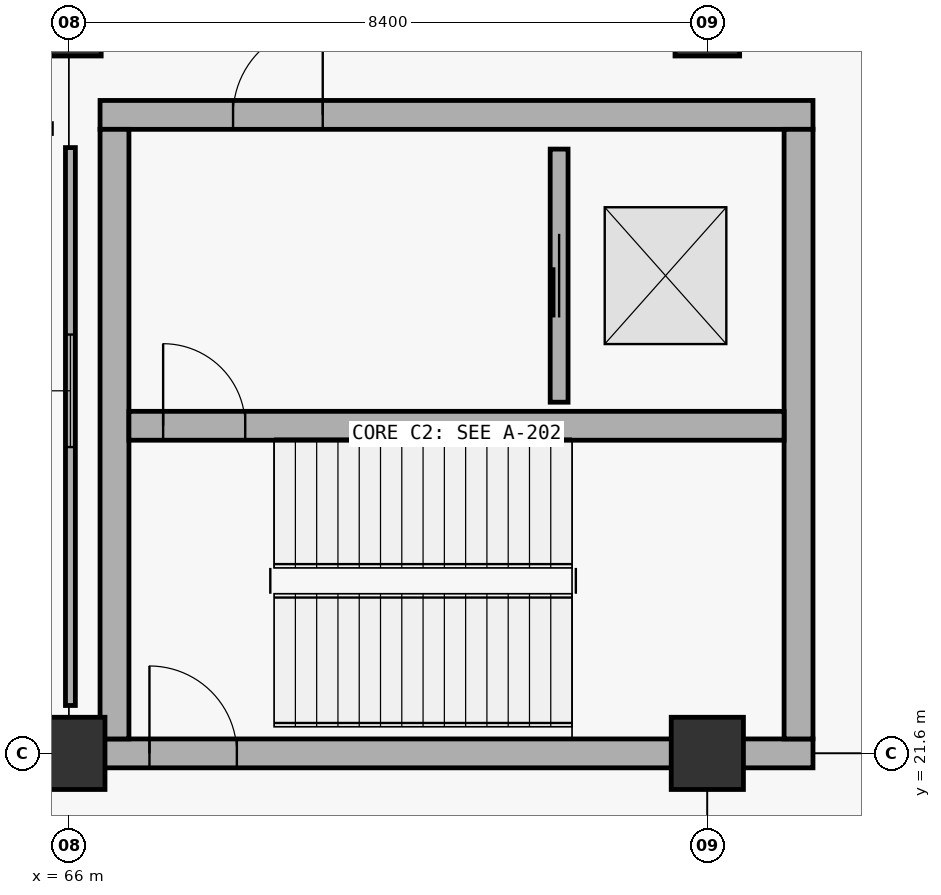
"""IFC4 building model, lengths in metres.
Left out: names, types, materials, properties, quantities, classifications, styles, units other than length and angle.
Written with IfcOpenShell. Run it as: python <this file> out.ifc"""

import sys

from ifc_helpers import new_model, si_unit, direction, frame, frame_2d, origin, origin_2d, place, context, subcontext, project, spatial, rectangle, extrude, element, fill, save


model = new_model("IFC4")
c1 = context("Model", 3, precision=1e-05, world=origin(), true_north=direction((0.0, 1.0)))
c2 = subcontext(c1, "Body", "Model", "MODEL_VIEW")
j1 = project(units=[si_unit("LENGTHUNIT", "METRE"), si_unit("PLANEANGLEUNIT", "RADIAN")], contexts=[c1])
p1 = place(None, origin())
s1 = spatial("IfcSite", under=j1, at=p1, CompositionType="ELEMENT")
p2 = place(p1, origin())
s2 = spatial("IfcBuilding", under=s1, at=p2, CompositionType="ELEMENT")
p3 = place(p2, origin())
s3 = spatial("IfcBuildingStorey", under=s2, at=p3, CompositionType="ELEMENT", Elevation=0.0)
p4 = place(p3, frame((66.0, 21.6, 0.0), z_axis=(0.0, 0.0, 1.0), x_axis=(1.0, 0.0, 0.0)))
e1 = element("IfcColumn", 1, at=p4, inside=s3, PredefinedType="COLUMN", context=c2, shape_type="SweptSolid", body=[
    extrude(rectangle(XDim=0.95, YDim=0.95, at=origin_2d()), origin(), (0.0, 0.0, 1.0), 5.4),
])
p5 = place(p3, frame((66.0, 31.2, 0.0), z_axis=(0.0, 0.0, 1.0), x_axis=(1.0, 0.0, 0.0)))
e2 = element("IfcColumn", 2, at=p5, inside=s3, PredefinedType="COLUMN", context=c2, shape_type="SweptSolid", body=[
    extrude(rectangle(XDim=0.85, YDim=0.85, at=origin_2d()), origin(), (0.0, 0.0, 1.0), 5.4),
])
p6 = place(p3, frame((74.4, 21.6, 0.0), z_axis=(0.0, 0.0, 1.0), x_axis=(1.0, 0.0, 0.0)))
e3 = element("IfcColumn", 3, at=p6, inside=s3, PredefinedType="COLUMN", context=c2, shape_type="SweptSolid", body=[
    extrude(rectangle(XDim=0.95, YDim=0.95, at=origin_2d()), origin(), (0.0, 0.0, 1.0), 5.4),
])
p7 = place(p3, frame((74.4, 31.2, 0.0), z_axis=(0.0, 0.0, 1.0), x_axis=(1.0, 0.0, 0.0)))
e4 = element("IfcColumn", 4, at=p7, inside=s3, PredefinedType="COLUMN", context=c2, shape_type="SweptSolid", body=[
    extrude(rectangle(XDim=0.85, YDim=0.85, at=origin_2d()), origin(), (0.0, 0.0, 1.0), 5.4),
])
p8 = place(p3, frame((66.41, 21.6, 0.0), z_axis=(0.0, 0.0, 1.0), x_axis=(1.0, 0.0, 0.0)))
e5 = element("IfcWall", 5, at=p8, inside=s3, PredefinedType="SHEAR", context=c2, shape_type="SweptSolid", body=[
    extrude(rectangle(XDim=9.38, YDim=0.38, at=frame_2d((4.69, 0.0))), origin(), (0.0, 0.0, 1.0), 5.4),
])
p9 = place(p8, frame((0.65, 0.0, 0.0)))
e6 = element("IfcOpeningElement", 6, at=p9, cuts=e5, PredefinedType="OPENING", context=c2, shape_type="SweptSolid", body=[
    extrude(rectangle(XDim=1.15, YDim=2.2, at=frame_2d((0.575, 1.1))), frame((0.0, 0.2, 0.0), z_axis=(0.0, -1.0, 0.0), x_axis=(1.0, 0.0, 0.0)), (0.0, 0.0, 1.0), 0.4),
])
p10 = place(p3, frame((66.41, 30.0, 0.0), z_axis=(0.0, 0.0, 1.0), x_axis=(1.0, 0.0, 0.0)))
e7 = element("IfcWall", 7, at=p10, inside=s3, PredefinedType="SHEAR", context=c2, shape_type="SweptSolid", body=[
    extrude(rectangle(XDim=9.38, YDim=0.38, at=frame_2d((4.69, 0.0))), origin(), (0.0, 0.0, 1.0), 5.4),
])
p11 = place(p10, frame((1.75, 0.0, 0.0)))
e8 = element("IfcOpeningElement", 8, at=p11, cuts=e7, PredefinedType="OPENING", context=c2, shape_type="SweptSolid", body=[
    extrude(rectangle(XDim=1.18, YDim=2.24, at=frame_2d((0.59, 1.12))), frame((0.0, 0.2, 0.0), z_axis=(0.0, -1.0, 0.0), x_axis=(1.0, 0.0, 0.0)), (0.0, 0.0, 1.0), 0.4),
])
for number, where, z_axis, x_axis in (
    (9, (66.6, 21.79, 0.0), (0.0, 0.0, 1.0), (0.0, 1.0, 0.0)),
    (10, (75.6, 21.79, 0.0), (0.0, 0.0, 1.0), (0.0, 1.0, 0.0)),
):
    element("IfcWall", number, at=place(p3, frame(where, z_axis=z_axis, x_axis=x_axis)), inside=s3, PredefinedType="SHEAR", context=c2, shape_type="SweptSolid", body=[
        extrude(rectangle(XDim=8.02, YDim=0.38, at=frame_2d((4.01, 0.0))), origin(), (0.0, 0.0, 1.0), 5.4),
    ])
p12 = place(p3, frame((66.79, 25.91, 0.0), z_axis=(0.0, 0.0, 1.0), x_axis=(1.0, 0.0, 0.0)))
e11 = element("IfcWall", 11, at=p12, inside=s3, PredefinedType="SHEAR", context=c2, shape_type="SweptSolid", body=[
    extrude(rectangle(XDim=8.62, YDim=0.38, at=frame_2d((4.31, 0.0))), origin(), (0.0, 0.0, 1.0), 5.4),
])
p13 = place(p12, frame((0.45, 0.0, 0.0)))
e12 = element("IfcOpeningElement", 12, at=p13, cuts=e11, PredefinedType="OPENING", context=c2, shape_type="SweptSolid", body=[
    extrude(rectangle(XDim=1.08, YDim=2.18, at=frame_2d((0.54, 1.09))), frame((0.0, 0.2, 0.0), z_axis=(0.0, -1.0, 0.0), x_axis=(1.0, 0.0, 0.0)), (0.0, 0.0, 1.0), 0.4),
])
p14 = place(p3, frame((72.45, 26.22, 0.0), z_axis=(0.0, 0.0, 1.0), x_axis=(0.0, 1.0, 0.0)))
e13 = element("IfcWall", 13, at=p14, inside=s3, PredefinedType="PARTITIONING", context=c2, shape_type="SweptSolid", body=[
    extrude(rectangle(XDim=3.33, YDim=0.235, at=frame_2d((1.665, 0.0))), origin(), (0.0, 0.0, 1.0), 5.04),
])
p15 = place(p14, frame((1.115, 0.0, 0.0)))
e14 = element("IfcOpeningElement", 14, at=p15, cuts=e13, PredefinedType="OPENING", context=c2, shape_type="SweptSolid", body=[
    extrude(rectangle(XDim=1.1, YDim=2.2, at=frame_2d((0.55, 1.1))), frame((0.0, 0.127, 0.0), z_axis=(0.0, -1.0, 0.0), x_axis=(1.0, 0.0, 0.0)), (0.0, 0.0, 1.0), 0.255),
])
p16 = place(p3, frame((66.02, 22.23, 0.0), z_axis=(0.0, 0.0, 1.0), x_axis=(0.0, 1.0, 0.0)))
e15 = element("IfcWall", 15, at=p16, inside=s3, PredefinedType="PARTITIONING", context=c2, shape_type="SweptSolid", body=[
    extrude(rectangle(XDim=7.34, YDim=0.13, at=frame_2d((3.67, 0.0))), origin(), (0.0, 0.0, 1.0), 4.54),
])
p17 = place(p16, frame((3.4, 0.0, 0.9)))
e16 = element("IfcOpeningElement", 16, at=p17, cuts=e15, PredefinedType="OPENING", context=c2, shape_type="SweptSolid", body=[
    extrude(rectangle(XDim=1.48, YDim=1.35, at=frame_2d((0.74, 0.675))), frame((0.0, 0.075, 0.0), z_axis=(0.0, -1.0, 0.0), x_axis=(1.0, 0.0, 0.0)), (0.0, 0.0, 1.0), 0.15),
])
p18 = place(p9, origin())
e17 = element("IfcDoor", 17, at=p18, inside=s3, OperationType="SINGLE_SWING_LEFT", PredefinedType="DOOR", context=c2, shape_type="SweptSolid", body=[
    extrude(rectangle(XDim=1.15, YDim=2.2, at=frame_2d((0.575, 1.1))), frame((0.0, 0.025, 0.0), z_axis=(0.0, -1.0, 0.0), x_axis=(1.0, 0.0, 0.0)), (0.0, 0.0, 1.0), 0.05),
])
fill(e6, e17)
p19 = place(p13, origin())
e18 = element("IfcDoor", 18, at=p19, inside=s3, OperationType="SINGLE_SWING_LEFT", PredefinedType="DOOR", context=c2, shape_type="SweptSolid", body=[
    extrude(rectangle(XDim=1.08, YDim=2.18, at=frame_2d((0.54, 1.09))), frame((0.0, 0.025, 0.0), z_axis=(0.0, -1.0, 0.0), x_axis=(1.0, 0.0, 0.0)), (0.0, 0.0, 1.0), 0.05),
])
fill(e12, e18)
p20 = place(p11, origin())
e19 = element("IfcDoor", 19, at=p20, inside=s3, OperationType="SINGLE_SWING_RIGHT", PredefinedType="DOOR", context=c2, shape_type="SweptSolid", body=[
    extrude(rectangle(XDim=1.18, YDim=2.24, at=frame_2d((0.59, 1.12))), frame((0.0, 0.025, 0.0), z_axis=(0.0, -1.0, 0.0), x_axis=(1.0, 0.0, 0.0)), (0.0, 0.0, 1.0), 0.05),
])
fill(e8, e19)
p21 = place(p15, origin())
e20 = element("IfcDoor", 20, at=p21, inside=s3, OperationType="SLIDING_TO_LEFT", PredefinedType="DOOR", context=c2, shape_type="SweptSolid", body=[
    extrude(rectangle(XDim=1.1, YDim=2.2, at=frame_2d((0.55, 1.1))), frame((0.0, 0.025, 0.0), z_axis=(0.0, -1.0, 0.0), x_axis=(1.0, 0.0, 0.0)), (0.0, 0.0, 1.0), 0.05),
])
fill(e14, e20)
p22 = place(p17, origin())
e21 = element("IfcWindow", 21, at=p22, inside=s3, PartitioningType="SINGLE_PANEL", PredefinedType="WINDOW", context=c2, shape_type="SweptSolid", body=[
    extrude(rectangle(XDim=1.48, YDim=1.35, at=frame_2d((0.74, 0.675))), frame((0.0, 0.03, 0.0), z_axis=(0.0, -1.0, 0.0), x_axis=(1.0, 0.0, 0.0)), (0.0, 0.0, 1.0), 0.06),
])
fill(e16, e21)
save(model, sys.argv[1])
